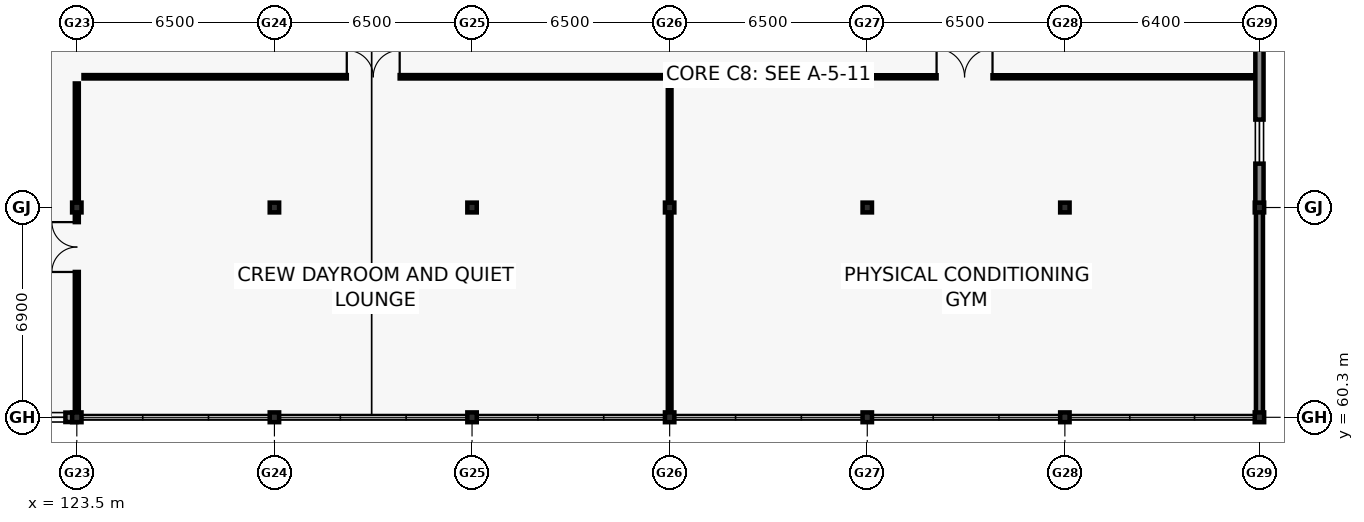
"""IFC4 building model, lengths in metres.
Left out: names, types, materials, properties, quantities, classifications, styles, units other than length and angle.
Written with IfcOpenShell. Run it as: python <this file> out.ifc"""

import sys

from ifc_helpers import new_model, si_unit, direction, frame, frame_2d, origin, origin_2d, place, context, subcontext, project, spatial, rectangle, i_section, extrude, element, fill, save


model = new_model("IFC4")
c1 = context("Model", 3, precision=1e-05, world=origin(), true_north=direction((0.0, 1.0)))
c2 = subcontext(c1, "Body", "Model", "MODEL_VIEW")
j1 = project(units=[si_unit("LENGTHUNIT", "METRE"), si_unit("PLANEANGLEUNIT", "RADIAN")], contexts=[c1])
p1 = place(None, origin())
s1 = spatial("IfcSite", under=j1, at=p1, CompositionType="ELEMENT")
p2 = place(p1, origin())
s2 = spatial("IfcBuilding", under=s1, at=p2, CompositionType="ELEMENT")
p3 = place(p2, frame((0.0, 0.0, 5.4)))
s3 = spatial("IfcBuildingStorey", under=s2, at=p3, CompositionType="ELEMENT", Elevation=5.4)
for number, where, z_axis, x_axis in (
    (1, (123.5, 60.3, 0.0), (0.0, 0.0, 1.0), (1.0, 0.0, 0.0)),
    (2, (123.5, 67.2, 0.0), (0.0, 0.0, 1.0), (1.0, 0.0, 0.0)),
    (3, (130.0, 60.3, 0.0), (0.0, 0.0, 1.0), (1.0, 0.0, 0.0)),
    (4, (130.0, 67.2, 0.0), (0.0, 0.0, 1.0), (1.0, 0.0, 0.0)),
    (5, (136.5, 60.3, 0.0), (0.0, 0.0, 1.0), (1.0, 0.0, 0.0)),
    (6, (136.5, 67.2, 0.0), (0.0, 0.0, 1.0), (1.0, 0.0, 0.0)),
    (7, (143.0, 60.3, 0.0), (0.0, 0.0, 1.0), (1.0, 0.0, 0.0)),
    (8, (143.0, 67.2, 0.0), (0.0, 0.0, 1.0), (1.0, 0.0, 0.0)),
    (9, (149.5, 60.3, 0.0), (0.0, 0.0, 1.0), (1.0, 0.0, 0.0)),
    (10, (149.5, 67.2, 0.0), (0.0, 0.0, 1.0), (1.0, 0.0, 0.0)),
    (11, (156.0, 60.3, 0.0), (0.0, 0.0, 1.0), (1.0, 0.0, 0.0)),
    (12, (156.0, 67.2, 0.0), (0.0, 0.0, 1.0), (1.0, 0.0, 0.0)),
    (13, (162.4, 60.3, 0.0), (0.0, 0.0, 1.0), (1.0, 0.0, 0.0)),
    (14, (162.4, 67.2, 0.0), (0.0, 0.0, 1.0), (1.0, 0.0, 0.0)),
):
    element("IfcColumn", number, at=place(p3, frame(where, z_axis=z_axis, x_axis=x_axis)), inside=s3, PredefinedType="COLUMN", context=c2, shape_type="SweptSolid", body=[
        extrude(i_section(OverallWidth=0.309, OverallDepth=0.321, WebThickness=0.014, FlangeThickness=0.022, FilletRadius=0.017, at=origin_2d()), origin(), (0.0, 0.0, 1.0), 4.2),
    ])
p4 = place(p3, frame((123.495, 60.3, 0.0), z_axis=(0.0, 0.0, 1.0), x_axis=(-1.0, 0.0, 0.0)))
e15 = element("IfcWall", 15, at=p4, inside=s3, PredefinedType="SOLIDWALL", context=c2, shape_type="SweptSolid", body=[
    extrude(rectangle(XDim=2.49, YDim=0.31, at=frame_2d((1.245, 0.0))), origin(), (0.0, 0.0, 1.0), 3.32),
])
p5 = place(p4, frame((0.37, 0.0, 0.8)))
e16 = element("IfcOpeningElement", 16, at=p5, cuts=e15, PredefinedType="OPENING", context=c2, shape_type="SweptSolid", body=[
    extrude(rectangle(XDim=1.75, YDim=1.8, at=frame_2d((0.875, 0.9))), frame((0.0, 0.165, 0.0), z_axis=(0.0, -1.0, 0.0), x_axis=(1.0, 0.0, 0.0)), (0.0, 0.0, 1.0), 0.33),
])
p6 = place(p3, frame((162.4, 67.195, 0.0), z_axis=(0.0, 0.0, 1.0), x_axis=(0.0, -1.0, 0.0)))
e17 = element("IfcWall", 17, at=p6, inside=s3, PredefinedType="SOLIDWALL", context=c2, shape_type="SweptSolid", body=[
    extrude(rectangle(XDim=6.89, YDim=0.23, at=frame_2d((3.445, 0.0))), origin(), (0.0, 0.0, 1.0), 3.32),
])
p7 = place(p3, frame((162.4, 74.095, 0.0), z_axis=(0.0, 0.0, 1.0), x_axis=(0.0, -1.0, 0.0)))
e18 = element("IfcWall", 18, at=p7, inside=s3, PredefinedType="SOLIDWALL", context=c2, shape_type="SweptSolid", body=[
    extrude(rectangle(XDim=6.89, YDim=0.27, at=frame_2d((3.445, 0.0))), origin(), (0.0, 0.0, 1.0), 3.32),
])
p8 = place(p7, frame((4.002, 0.0, 0.8)))
e19 = element("IfcOpeningElement", 19, at=p8, cuts=e18, PredefinedType="OPENING", context=c2, shape_type="SweptSolid", body=[
    extrude(rectangle(XDim=1.45, YDim=1.8, at=frame_2d((0.725, 0.9))), frame((0.0, 0.145, 0.0), z_axis=(0.0, -1.0, 0.0), x_axis=(1.0, 0.0, 0.0)), (0.0, 0.0, 1.0), 0.29),
])
p9 = place(p3, frame((123.5, 60.52, 0.0), z_axis=(0.0, 0.0, 1.0), x_axis=(0.0, 1.0, 0.0)))
e20 = element("IfcWall", 20, at=p9, inside=s3, PredefinedType="PARTITIONING", context=c2, shape_type="SweptSolid", body=[
    extrude(rectangle(XDim=10.76, YDim=0.13, at=frame_2d((5.38, 0.0))), origin(), (0.0, 0.0, 1.0), 3.3),
])
p10 = place(p9, frame((4.56, 0.0, 0.0)))
e21 = element("IfcOpeningElement", 21, at=p10, cuts=e20, PredefinedType="OPENING", context=c2, shape_type="SweptSolid", body=[
    extrude(rectangle(XDim=1.64, YDim=2.2, at=frame_2d((0.82, 1.1))), frame((0.0, 0.075, 0.0), z_axis=(0.0, -1.0, 0.0), x_axis=(1.0, 0.0, 0.0)), (0.0, 0.0, 1.0), 0.15),
])
p11 = place(p3, frame((143.0, 60.52, 0.0), z_axis=(0.0, 0.0, 1.0), x_axis=(0.0, 1.0, 0.0)))
e22 = element("IfcWall", 22, at=p11, inside=s3, PredefinedType="PARTITIONING", context=c2, shape_type="SweptSolid", body=[
    extrude(rectangle(XDim=10.76, YDim=0.12, at=frame_2d((5.38, 0.0))), origin(), (0.0, 0.0, 1.0), 3.3),
])
p12 = place(p3, frame((123.72, 71.5, 0.0), z_axis=(0.0, 0.0, 1.0), x_axis=(1.0, 0.0, 0.0)))
e23 = element("IfcWall", 23, at=p12, inside=s3, PredefinedType="PARTITIONING", context=c2, shape_type="SweptSolid", body=[
    extrude(rectangle(XDim=19.06, YDim=0.11, at=frame_2d((9.53, 0.0))), origin(), (0.0, 0.0, 1.0), 3.3),
])
p13 = place(p12, frame((8.66, 0.0, 0.0)))
e24 = element("IfcOpeningElement", 24, at=p13, cuts=e23, PredefinedType="OPENING", context=c2, shape_type="SweptSolid", body=[
    extrude(rectangle(XDim=1.74, YDim=2.2, at=frame_2d((0.87, 1.1))), frame((0.0, 0.065, 0.0), z_axis=(0.0, -1.0, 0.0), x_axis=(1.0, 0.0, 0.0)), (0.0, 0.0, 1.0), 0.13),
])
p14 = place(p3, frame((143.22, 71.5, 0.0), z_axis=(0.0, 0.0, 1.0), x_axis=(1.0, 0.0, 0.0)))
e25 = element("IfcWall", 25, at=p14, inside=s3, PredefinedType="PARTITIONING", context=c2, shape_type="SweptSolid", body=[
    extrude(rectangle(XDim=18.96, YDim=0.1, at=frame_2d((9.48, 0.0))), origin(), (0.0, 0.0, 1.0), 3.3),
])
p15 = place(p14, frame((8.56, 0.0, 0.0)))
e26 = element("IfcOpeningElement", 26, at=p15, cuts=e25, PredefinedType="OPENING", context=c2, shape_type="SweptSolid", body=[
    extrude(rectangle(XDim=1.84, YDim=2.22, at=frame_2d((0.92, 1.11))), frame((0.0, 0.06, 0.0), z_axis=(0.0, -1.0, 0.0), x_axis=(1.0, 0.0, 0.0)), (0.0, 0.0, 1.0), 0.12),
])
p16 = place(p5, origin())
e27 = element("IfcWindow", 27, at=p16, inside=s3, PartitioningType="DOUBLE_PANEL_VERTICAL", PredefinedType="WINDOW", context=c2, shape_type="SweptSolid", body=[
    extrude(rectangle(XDim=1.75, YDim=1.8, at=frame_2d((0.875, 0.9))), frame((0.0, 0.03, 0.0), z_axis=(0.0, -1.0, 0.0), x_axis=(1.0, 0.0, 0.0)), (0.0, 0.0, 1.0), 0.06),
])
fill(e16, e27)
p17 = place(p8, origin())
e28 = element("IfcWindow", 28, at=p17, inside=s3, PartitioningType="SINGLE_PANEL", PredefinedType="WINDOW", context=c2, shape_type="SweptSolid", body=[
    extrude(rectangle(XDim=1.45, YDim=1.8, at=frame_2d((0.725, 0.9))), frame((0.0, 0.03, 0.0), z_axis=(0.0, -1.0, 0.0), x_axis=(1.0, 0.0, 0.0)), (0.0, 0.0, 1.0), 0.06),
])
fill(e19, e28)
p18 = place(p10, origin())
e29 = element("IfcDoor", 29, at=p18, inside=s3, OperationType="DOUBLE_DOOR_SINGLE_SWING", PredefinedType="DOOR", context=c2, shape_type="SweptSolid", body=[
    extrude(rectangle(XDim=1.64, YDim=2.2, at=frame_2d((0.82, 1.1))), frame((0.0, 0.025, 0.0), z_axis=(0.0, -1.0, 0.0), x_axis=(1.0, 0.0, 0.0)), (0.0, 0.0, 1.0), 0.05),
])
fill(e21, e29)
p19 = place(p13, origin())
e30 = element("IfcDoor", 30, at=p19, inside=s3, OperationType="DOUBLE_DOOR_SINGLE_SWING", PredefinedType="DOOR", context=c2, shape_type="SweptSolid", body=[
    extrude(rectangle(XDim=1.74, YDim=2.2, at=frame_2d((0.87, 1.1))), frame((0.0, 0.025, 0.0), z_axis=(0.0, -1.0, 0.0), x_axis=(1.0, 0.0, 0.0)), (0.0, 0.0, 1.0), 0.05),
])
fill(e24, e30)
p20 = place(p15, origin())
e31 = element("IfcDoor", 31, at=p20, inside=s3, OperationType="DOUBLE_DOOR_SINGLE_SWING", PredefinedType="DOOR", context=c2, shape_type="SweptSolid", body=[
    extrude(rectangle(XDim=1.84, YDim=2.22, at=frame_2d((0.92, 1.11))), frame((0.0, 0.025, 0.0), z_axis=(0.0, -1.0, 0.0), x_axis=(1.0, 0.0, 0.0)), (0.0, 0.0, 1.0), 0.05),
])
fill(e26, e31)
save(model, sys.argv[1])
